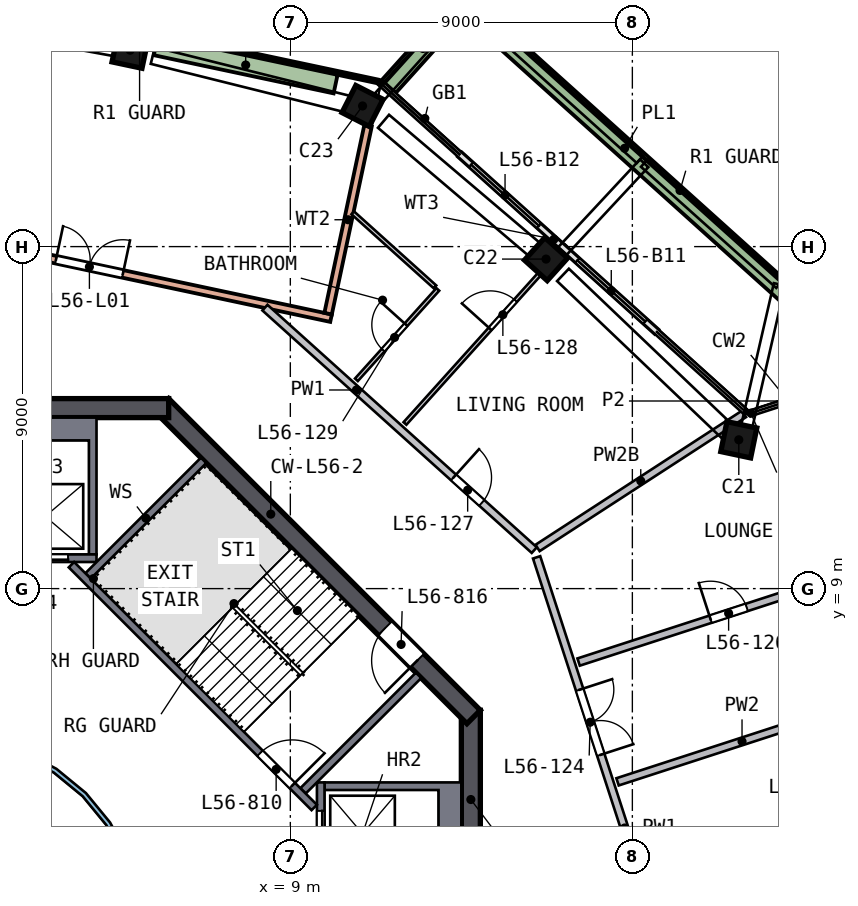
"""IFC4 building model, lengths in metres.
Left out: names, types, materials, properties, quantities, classifications, styles, units other than length and angle.
Written with IfcOpenShell. Run it as: python <this file> out.ifc"""

import sys

from ifc_helpers import new_model, si_unit, direction, frame, frame_2d, origin, origin_2d, place, context, subcontext, project, spatial, polyline, rectangle, outline, extrude, element, fill, save


model = new_model("IFC4")
c1 = context("Model", 3, precision=1e-05, world=origin(), true_north=direction((0.0, 1.0)))
c2 = subcontext(c1, "Body", "Model", "MODEL_VIEW")
j1 = project(units=[si_unit("LENGTHUNIT", "METRE"), si_unit("PLANEANGLEUNIT", "RADIAN")], contexts=[c1])
p1 = place(None, origin())
s1 = spatial("IfcSite", under=j1, at=p1, CompositionType="ELEMENT")
p2 = place(p1, origin())
s2 = spatial("IfcBuilding", under=s1, at=p2, CompositionType="ELEMENT")
p3 = place(p2, frame((0.0, 0.0, 230.5)))
s3 = spatial("IfcBuildingStorey", under=s2, at=p3, CompositionType="ELEMENT", Elevation=230.5)
p4 = place(p3, frame((20.875, 12.797, 0.0), z_axis=(-0.061723248, 0.098741994, 0.993196989), x_axis=(0.976425462, -0.200246615, 0.08058915)))
e1 = element("IfcColumn", 1, at=p4, inside=s3, PredefinedType="COLUMN", context=c2, shape_type="SweptSolid", body=[
    extrude(rectangle(XDim=0.8, YDim=0.8, at=origin_2d()), origin(), (0.0, 0.0, 1.0), 3.212),
])
p5 = place(p3, frame((15.831, 17.582, 0.0), z_axis=(-0.084261508, 0.074603375, 0.993646987), x_axis=(-0.738340463, 0.664972628, -0.112537837)))
e2 = element("IfcColumn", 2, at=p5, inside=s3, PredefinedType="COLUMN", context=c2, shape_type="SweptSolid", body=[
    extrude(rectangle(XDim=0.8, YDim=0.8, at=origin_2d()), origin(), (0.0, 0.0, 1.0), 3.21),
])
p6 = place(p3, frame((11.025, 21.639, 0.0), z_axis=(-0.103314818, 0.051543375, 0.993312302), x_axis=(0.885041164, -0.450968307, 0.11545442)))
e3 = element("IfcColumn", 3, at=p6, inside=s3, PredefinedType="COLUMN", context=c2, shape_type="SweptSolid", body=[
    extrude(rectangle(XDim=0.8, YDim=0.8, at=origin_2d()), origin(), (0.0, 0.0, 1.0), 3.211),
])
p7 = place(p3, frame((4.919, 23.141, 0.0), z_axis=(-0.110270183, 0.022434279, 0.993648424), x_axis=(-0.971985836, 0.206353156, -0.112525153)))
e4 = element("IfcColumn", 4, at=p7, inside=s3, PredefinedType="COLUMN", context=c2, shape_type="SweptSolid", body=[
    extrude(rectangle(XDim=0.8, YDim=0.8, at=origin_2d()), origin(), (0.0, 0.0, 1.0), 3.21),
])
p8 = place(p3, frame((13.75, -5.799, 0.0), z_axis=(0.0, 0.0, 1.0), x_axis=(0.0, 1.0, 0.0)))
e5 = element("IfcWall", 5, at=p8, inside=s3, PredefinedType="SHEAR", context=c2, shape_type="SweptSolid", body=[
    extrude(rectangle(XDim=11.598, YDim=0.5, at=frame_2d((5.799, 0.0))), origin(), (0.0, 0.0, 1.0), 3.5),
])
p9 = place(p8, frame((4.899, 0.0, 0.0)))
e6 = element("IfcOpeningElement", 6, at=p9, cuts=e5, PredefinedType="OPENING", context=c2, shape_type="SweptSolid", body=[
    extrude(rectangle(XDim=1.8, YDim=2.1, at=frame_2d((0.9, 1.05))), frame((0.0, 0.26, 0.0), z_axis=(0.0, -1.0, 0.0), x_axis=(1.0, 0.0, 0.0)), (0.0, 0.0, 1.0), 0.52),
])
p10 = place(p3, frame((13.823, 5.622, 0.0), z_axis=(0.0, 0.0, 1.0), x_axis=(-0.707106781, 0.707106781, 0.0)))
e7 = element("IfcWall", 7, at=p10, inside=s3, PredefinedType="SHEAR", context=c2, shape_type="SweptSolid", body=[
    extrude(rectangle(XDim=11.598, YDim=0.5, at=frame_2d((5.799, 0.0))), origin(), (0.0, 0.0, 1.0), 3.5),
])
p11 = place(p10, frame((2.099, 0.0, 0.0)))
e8 = element("IfcOpeningElement", 8, at=p11, cuts=e7, PredefinedType="OPENING", context=c2, shape_type="SweptSolid", body=[
    extrude(rectangle(XDim=1.2, YDim=2.1, at=frame_2d((0.6, 1.05))), frame((0.0, 0.26, 0.0), z_axis=(0.0, -1.0, 0.0), x_axis=(1.0, 0.0, 0.0)), (0.0, 0.0, 1.0), 0.52),
])
p12 = place(p3, frame((5.799, 13.75, 0.0), z_axis=(0.0, 0.0, 1.0), x_axis=(-1.0, 0.0, 0.0)))
e9 = element("IfcWall", 9, at=p12, inside=s3, PredefinedType="SHEAR", context=c2, shape_type="SweptSolid", body=[
    extrude(rectangle(XDim=11.598, YDim=0.5, at=frame_2d((5.799, 0.0))), origin(), (0.0, 0.0, 1.0), 3.5),
])
p13 = place(p12, frame((4.899, 0.0, 0.0)))
e10 = element("IfcOpeningElement", 10, at=p13, cuts=e9, PredefinedType="OPENING", context=c2, shape_type="SweptSolid", body=[
    extrude(rectangle(XDim=1.8, YDim=2.1, at=frame_2d((0.9, 1.05))), frame((0.0, 0.26, 0.0), z_axis=(0.0, -1.0, 0.0), x_axis=(1.0, 0.0, 0.0)), (0.0, 0.0, 1.0), 0.52),
])
p14 = place(p3, frame((18.634, 15.764, 0.0), z_axis=(0.0, 0.0, 1.0), x_axis=(-0.743165376, 0.669107781, 0.0)))
e11 = element("IfcWall", 11, at=p14, inside=s3, PredefinedType="SOLIDWALL", context=c2, shape_type="SweptSolid", body=[
    extrude(rectangle(XDim=3.3, YDim=0.15, at=frame_2d((1.65, 0.0))), origin(), (0.0, 0.0, 1.0), 2.525),
])
p15 = place(p14, frame((0.4, 0.0, 0.0)))
e12 = element("IfcOpeningElement", 12, at=p15, cuts=e11, PredefinedType="OPENING", context=c2, shape_type="SweptSolid", body=[
    extrude(rectangle(XDim=2.4, YDim=2.4, at=frame_2d((1.2, 1.2))), frame((0.0, 0.085, 0.0), z_axis=(0.0, -1.0, 0.0), x_axis=(1.0, 0.0, 0.0)), (0.0, 0.0, 1.0), 0.17),
])
p16 = place(p3, frame((16.182, 17.972, 0.0), z_axis=(0.0, 0.0, 1.0), x_axis=(-0.743144927, 0.669130493, 0.0)))
e13 = element("IfcWall", 13, at=p16, inside=s3, PredefinedType="SOLIDWALL", context=c2, shape_type="SweptSolid", body=[
    extrude(rectangle(XDim=3.661, YDim=0.15, at=frame_2d((1.831, 0.0))), origin(), (0.0, 0.0, 1.0), 2.525),
])
p17 = place(p16, frame((0.861, 0.0, 0.0)))
e14 = element("IfcOpeningElement", 14, at=p17, cuts=e13, PredefinedType="OPENING", context=c2, shape_type="SweptSolid", body=[
    extrude(rectangle(XDim=2.4, YDim=2.4, at=frame_2d((1.2, 1.2))), frame((0.0, 0.085, 0.0), z_axis=(0.0, -1.0, 0.0), x_axis=(1.0, 0.0, 0.0)), (0.0, 0.0, 1.0), 0.17),
])
p18 = place(p3, frame((22.218, 16.607, 0.0), z_axis=(0.0, 0.0, 1.0), x_axis=(-0.743143128, 0.669132491, 0.0)))
e15 = element("IfcWall", 15, at=p18, inside=s3, PredefinedType="SOLIDWALL", context=c2, shape_type="SweptSolid", body=[
    extrude(rectangle(XDim=11.898, YDim=0.5, at=frame_2d((5.949, 0.0))), origin(), (0.0, 0.0, 1.0), 0.7),
])
p19 = place(p3, frame((13.394, 24.216, 0.0), z_axis=(0.0, 0.0, 1.0), x_axis=(-0.669144611, -0.743132215, 0.0)))
e16 = element("IfcWall", 16, at=p19, inside=s3, PredefinedType="SOLIDWALL", context=c2, shape_type="SweptSolid", body=[
    extrude(rectangle(XDim=2.699, YDim=0.5, at=frame_2d((1.35, 0.0))), origin(), (0.0, 0.0, 1.0), 0.7),
])
p20 = place(p3, frame((-2.645, 18.82, 0.0), z_axis=(0.0, 0.0, 1.0), x_axis=(0.978146821, -0.207915357, 0.0)))
e17 = element("IfcWall", 17, at=p20, inside=s3, PredefinedType="SOLIDWALL", context=c2, shape_type="SweptSolid", body=[
    extrude(rectangle(XDim=13.0, YDim=0.2, at=frame_2d((6.5, 0.0))), origin(), (0.0, 0.0, 1.0), 3.19),
])
p21 = place(p20, frame((5.6, 0.0, 0.0)))
e18 = element("IfcOpeningElement", 18, at=p21, cuts=e17, PredefinedType="OPENING", context=c2, shape_type="SweptSolid", body=[
    extrude(rectangle(XDim=1.8, YDim=2.4, at=frame_2d((0.9, 1.2))), frame((0.0, 0.11, 0.0), z_axis=(0.0, -1.0, 0.0), x_axis=(1.0, 0.0, 0.0)), (0.0, 0.0, 1.0), 0.22),
])
p22 = place(p3, frame((11.045, 21.178, 0.0), z_axis=(0.0, 0.0, 1.0), x_axis=(-0.207928668, -0.978143992, 0.0)))
e19 = element("IfcWall", 19, at=p22, inside=s3, PredefinedType="SOLIDWALL", context=c2, shape_type="SweptSolid", body=[
    extrude(rectangle(XDim=5.053, YDim=0.2, at=frame_2d((2.527, 0.0))), origin(), (0.0, 0.0, 1.0), 3.19),
])
p23 = place(p3, frame((11.313, 22.344, 0.0), z_axis=(0.0, 0.0, 1.0), x_axis=(-0.978146672, 0.207916061, 0.0)))
e20 = element("IfcWall", 20, at=p23, inside=s3, PredefinedType="SOLIDWALL", context=c2, shape_type="SweptSolid", body=[
    extrude(rectangle(XDim=12.84, YDim=0.1, at=frame_2d((6.42, 0.0))), origin(), (0.0, 0.0, 1.0), 0.7),
])
p24 = place(p3, frame((10.191, 22.276, 0.0), z_axis=(0.0, 0.0, 1.0), x_axis=(-0.97814679, 0.207915504, 0.0)))
e21 = element("IfcWall", 21, at=p24, inside=s3, PredefinedType="SOLIDWALL", context=c2, shape_type="SweptSolid", body=[
    extrude(rectangle(XDim=4.837, YDim=0.5, at=frame_2d((2.418, 0.0))), origin(), (0.0, 0.0, 1.0), 0.7),
])
p25 = place(p3, origin())
e22 = element("IfcWall", 22, at=p25, inside=s3, PredefinedType="SOLIDWALL", context=c2, shape_type="SweptSolid", body=[
    extrude(outline(polyline([(13.5, 3.9), (13.5, 1.2), (9.9, 1.2), (9.9, 1.4), (12.9, 1.4), (12.9, 3.7), (9.9, 3.7), (9.9, 3.9), (13.5, 3.9)])), origin(), (0.0, 0.0, 1.0), 3.19),
])
p26 = place(p3, frame((9.8, 1.2, 0.0), z_axis=(0.0, 0.0, 1.0), x_axis=(0.0, 1.0, 0.0)))
e23 = element("IfcWall", 23, at=p26, inside=s3, PredefinedType="SOLIDWALL", context=c2, shape_type="SweptSolid", body=[
    extrude(rectangle(XDim=2.7, YDim=0.2, at=frame_2d((1.35, 0.0))), origin(), (0.0, 0.0, 1.0), 3.19),
])
p27 = place(p26, frame((0.75, 0.0, 0.0)))
e24 = element("IfcOpeningElement", 24, at=p27, cuts=e23, PredefinedType="OPENING", context=c2, shape_type="SweptSolid", body=[
    extrude(rectangle(XDim=1.2, YDim=2.1, at=frame_2d((0.6, 1.05))), frame((0.0, 0.11, 0.0), z_axis=(0.0, -1.0, 0.0), x_axis=(1.0, 0.0, 0.0)), (0.0, 0.0, 1.0), 0.22),
])
p28 = place(p3, origin())
e25 = element("IfcWall", 25, at=p28, inside=s3, PredefinedType="SOLIDWALL", context=c2, shape_type="SweptSolid", body=[
    extrude(outline(polyline([(3.9, 9.9), (3.7, 9.9), (3.7, 12.9), (1.4, 12.9), (1.4, 9.9), (1.2, 9.9), (1.2, 13.5), (3.9, 13.5), (3.9, 9.9)])), origin(), (0.0, 0.0, 1.0), 3.19),
])
p29 = place(p3, frame((1.2, 9.8, 0.0), z_axis=(0.0, 0.0, 1.0), x_axis=(1.0, 0.0, 0.0)))
e26 = element("IfcWall", 26, at=p29, inside=s3, PredefinedType="SOLIDWALL", context=c2, shape_type="SweptSolid", body=[
    extrude(rectangle(XDim=2.7, YDim=0.2, at=frame_2d((1.35, 0.0))), origin(), (0.0, 0.0, 1.0), 3.19),
])
p30 = place(p29, frame((0.75, 0.0, 0.0)))
e27 = element("IfcOpeningElement", 27, at=p30, cuts=e26, PredefinedType="OPENING", context=c2, shape_type="SweptSolid", body=[
    extrude(rectangle(XDim=1.2, YDim=2.1, at=frame_2d((0.6, 1.05))), frame((0.0, 0.11, 0.0), z_axis=(0.0, -1.0, 0.0), x_axis=(1.0, 0.0, 0.0)), (0.0, 0.0, 1.0), 0.22),
])
p31 = place(p3, frame((3.24, 9.629, 0.0), z_axis=(0.0, 0.0, 1.0), x_axis=(0.707106781, -0.707106781, 0.0)))
e28 = element("IfcWall", 28, at=p31, inside=s3, PredefinedType="SOLIDWALL", context=c2, shape_type="SweptSolid", body=[
    extrude(rectangle(XDim=9.036, YDim=0.2, at=frame_2d((4.518, 0.0))), origin(), (0.0, 0.0, 1.0), 3.19),
])
p32 = place(p31, frame((7.018, 0.0, 0.0)))
e29 = element("IfcOpeningElement", 29, at=p32, cuts=e28, PredefinedType="OPENING", context=c2, shape_type="SweptSolid", body=[
    extrude(rectangle(XDim=1.2, YDim=2.1, at=frame_2d((0.6, 1.05))), frame((0.0, 0.11, 0.0), z_axis=(0.0, -1.0, 0.0), x_axis=(1.0, 0.0, 0.0)), (0.0, 0.0, 1.0), 0.22),
])
for number, where, z_axis, x_axis in (
    (30, (9.334, 3.677, 0.0), (0.0, 0.0, 1.0), (0.707, 0.707, 0.0)),
    (31, (3.677, 9.334, 0.0), (0.0, 0.0, 1.0), (0.707, 0.707, 0.0)),
):
    element("IfcWall", number, at=place(p3, frame(where, z_axis=z_axis, x_axis=x_axis)), inside=s3, PredefinedType="SOLIDWALL", context=c2, shape_type="SweptSolid", body=[
        extrude(rectangle(XDim=4.3, YDim=0.2, at=frame_2d((2.15, 0.0))), origin(), (0.0, 0.0, 1.0), 3.19),
    ])
p33 = place(p3, origin())
e32 = element("IfcWall", 32, at=p33, inside=s3, PredefinedType="SOLIDWALL", context=c2, shape_type="SweptSolid", body=[
    extrude(outline(polyline([(5.021, -0.999), (4.73, -1.959), (4.257, -2.844), (3.62, -3.62), (2.844, -4.257), (1.959, -4.73), (0.999, -5.021), (0.0, -5.12), (-0.999, -5.021), (-1.959, -4.73), (-2.844, -4.257), (-3.62, -3.62), (-4.257, -2.844), (-4.73, -1.959), (-5.021, -0.999), (-5.12, 0.0), (-5.021, 0.999), (-4.73, 1.959), (-4.257, 2.844), (-3.62, 3.62), (-2.844, 4.257), (-1.959, 4.73), (-0.999, 5.021), (0.0, 5.12), (0.999, 5.021), (1.959, 4.73), (2.844, 4.257), (3.62, 3.62), (4.257, 2.844), (4.73, 1.959), (5.021, 0.999), (5.12, 0.0), (5.021, -0.999)]), holes=[polyline([(4.904, 0.976), (4.619, 1.913), (4.157, 2.778), (3.535, 3.535), (2.778, 4.157), (1.913, 4.619), (0.976, 4.904), (0.0, 5.0), (-0.976, 4.904), (-1.913, 4.619), (-2.778, 4.157), (-3.535, 3.535), (-4.157, 2.778), (-4.619, 1.913), (-4.904, 0.976), (-5.0, 0.0), (-4.904, -0.976), (-4.619, -1.913), (-4.157, -2.778), (-3.535, -3.535), (-2.778, -4.157), (-1.913, -4.619), (-0.976, -4.904), (0.0, -5.0), (0.976, -4.904), (1.913, -4.619), (2.778, -4.157), (3.535, -3.535), (4.157, -2.778), (4.619, -1.913), (4.904, -0.976), (5.0, 0.0), (4.904, 0.976)])]), origin(), (0.0, 0.0, 1.0), 3.19),
])
p34 = place(p3, frame((8.332, 16.394, 0.0), z_axis=(0.0, 0.0, 1.0), x_axis=(0.743143917, -0.669131616, 0.0)))
e33 = element("IfcWall", 33, at=p34, inside=s3, PredefinedType="SOLIDWALL", context=c2, shape_type="SweptSolid", body=[
    extrude(rectangle(XDim=9.536, YDim=0.2, at=frame_2d((4.768, 0.0))), origin(), (0.0, 0.0, 1.0), 3.19),
])
p35 = place(p34, frame((6.678, 0.0, 0.0)))
e34 = element("IfcOpeningElement", 34, at=p35, cuts=e33, PredefinedType="OPENING", context=c2, shape_type="SweptSolid", body=[
    extrude(rectangle(XDim=1.0, YDim=2.1, at=frame_2d((0.5, 1.05))), frame((0.0, 0.11, 0.0), z_axis=(0.0, -1.0, 0.0), x_axis=(1.0, 0.0, 0.0)), (0.0, 0.0, 1.0), 0.22),
])
p36 = place(p3, frame((15.481, 9.823, 0.0), z_axis=(0.0, 0.0, 1.0), x_axis=(0.309001933, -0.95106141, 0.0)))
e35 = element("IfcWall", 35, at=p36, inside=s3, PredefinedType="SOLIDWALL", context=c2, shape_type="SweptSolid", body=[
    extrude(rectangle(XDim=9.317, YDim=0.2, at=frame_2d((4.658, 0.0))), origin(), (0.0, 0.0, 1.0), 3.19),
])
p37 = place(p36, frame((3.663, 0.0, 0.0)))
e36 = element("IfcOpeningElement", 36, at=p37, cuts=e35, PredefinedType="OPENING", context=c2, shape_type="SweptSolid", body=[
    extrude(rectangle(XDim=1.8, YDim=2.1, at=frame_2d((0.9, 1.05))), frame((0.0, 0.11, 0.0), z_axis=(0.0, -1.0, 0.0), x_axis=(1.0, 0.0, 0.0)), (0.0, 0.0, 1.0), 0.22),
])
p38 = place(p3, frame((15.506, 10.07, 0.0), z_axis=(0.0, 0.0, 1.0), x_axis=(0.838671806, 0.544637128, 0.0)))
e37 = element("IfcWall", 37, at=p38, inside=s3, PredefinedType="SOLIDWALL", context=c2, shape_type="SweptSolid", body=[
    extrude(rectangle(XDim=6.476, YDim=0.2, at=frame_2d((3.238, 0.0))), origin(), (0.0, 0.0, 1.0), 2.69),
])
p39 = place(p3, frame((16.586, 7.067, 0.0), z_axis=(0.0, 0.0, 1.0), x_axis=(0.951053293, 0.309026913, 0.0)))
e38 = element("IfcWall", 38, at=p39, inside=s3, PredefinedType="SOLIDWALL", context=c2, shape_type="SweptSolid", body=[
    extrude(rectangle(XDim=12.038, YDim=0.2, at=frame_2d((6.019, 0.0))), origin(), (0.0, 0.0, 1.0), 3.19),
])
p40 = place(p39, frame((3.65, 0.0, 0.0)))
e39 = element("IfcOpeningElement", 39, at=p40, cuts=e38, PredefinedType="OPENING", context=c2, shape_type="SweptSolid", body=[
    extrude(rectangle(XDim=1.0, YDim=2.1, at=frame_2d((0.5, 1.05))), frame((0.0, 0.11, 0.0), z_axis=(0.0, -1.0, 0.0), x_axis=(1.0, 0.0, 0.0)), (0.0, 0.0, 1.0), 0.22),
])
p41 = place(p3, frame((29.059, 7.635, 0.0), z_axis=(0.0, 0.0, 1.0), x_axis=(-0.951059254, -0.309008568, 0.0)))
e40 = element("IfcWall", 40, at=p41, inside=s3, PredefinedType="SOLIDWALL", context=c2, shape_type="SweptSolid", body=[
    extrude(rectangle(XDim=12.038, YDim=0.2, at=frame_2d((6.019, 0.0))), origin(), (0.0, 0.0, 1.0), 3.19),
])
p42 = place(p41, frame((3.95, 0.0, 0.0)))
e41 = element("IfcOpeningElement", 41, at=p42, cuts=e40, PredefinedType="OPENING", context=c2, shape_type="SweptSolid", body=[
    extrude(rectangle(XDim=1.0, YDim=2.1, at=frame_2d((0.5, 1.05))), frame((0.0, 0.11, 0.0), z_axis=(0.0, -1.0, 0.0), x_axis=(1.0, 0.0, 0.0)), (0.0, 0.0, 1.0), 0.22),
])
p43 = place(p3, frame((12.806, 16.94, 0.0), z_axis=(0.0, 0.0, 1.0), x_axis=(-0.74311485, 0.669163896, 0.0)))
e42 = element("IfcWall", 42, at=p43, inside=s3, PredefinedType="PARTITIONING", context=c2, shape_type="SweptSolid", body=[
    extrude(rectangle(XDim=2.912, YDim=0.1, at=frame_2d((1.456, 0.0))), origin(), (0.0, 0.0, 1.0), 3.19),
])
p44 = place(p3, frame((10.74, 14.495, 0.0), z_axis=(0.0, 0.0, 1.0), x_axis=(0.66909539, 0.743176533, 0.0)))
e43 = element("IfcWall", 43, at=p44, inside=s3, PredefinedType="PARTITIONING", context=c2, shape_type="SweptSolid", body=[
    extrude(rectangle(XDim=3.2, YDim=0.1, at=frame_2d((1.6, 0.0))), origin(), (0.0, 0.0, 1.0), 3.19),
])
p45 = place(p44, frame((1.05, 0.0, 0.0)))
e44 = element("IfcOpeningElement", 44, at=p45, cuts=e43, PredefinedType="OPENING", context=c2, shape_type="SweptSolid", body=[
    extrude(rectangle(XDim=0.9, YDim=2.1, at=frame_2d((0.45, 1.05))), frame((0.0, 0.06, 0.0), z_axis=(0.0, -1.0, 0.0), x_axis=(1.0, 0.0, 0.0)), (0.0, 0.0, 1.0), 0.12),
])
p46 = place(p3, frame((12.017, 13.346, 0.0), z_axis=(0.0, 0.0, 1.0), x_axis=(0.669118247, 0.743155953, 0.0)))
e45 = element("IfcWall", 45, at=p46, inside=s3, PredefinedType="PARTITIONING", context=c2, shape_type="SweptSolid", body=[
    extrude(rectangle(XDim=6.15, YDim=0.1, at=frame_2d((3.075, 0.0))), origin(), (0.0, 0.0, 1.0), 3.19),
])
p47 = place(p46, frame((3.35, 0.0, 0.0)))
e46 = element("IfcOpeningElement", 46, at=p47, cuts=e45, PredefinedType="OPENING", context=c2, shape_type="SweptSolid", body=[
    extrude(rectangle(XDim=1.0, YDim=2.1, at=frame_2d((0.5, 1.05))), frame((0.0, 0.06, 0.0), z_axis=(0.0, -1.0, 0.0), x_axis=(1.0, 0.0, 0.0)), (0.0, 0.0, 1.0), 0.12),
])
p48 = place(p15, origin())
e47 = element("IfcDoor", 47, at=p48, inside=s3, OperationType="SLIDING_TO_RIGHT", PredefinedType="DOOR", context=c2, shape_type="SweptSolid", body=[
    extrude(rectangle(XDim=2.4, YDim=2.4, at=frame_2d((1.2, 1.2))), frame((0.0, 0.025, 0.0), z_axis=(0.0, -1.0, 0.0), x_axis=(1.0, 0.0, 0.0)), (0.0, 0.0, 1.0), 0.05),
])
fill(e12, e47)
p49 = place(p17, origin())
e48 = element("IfcDoor", 48, at=p49, inside=s3, OperationType="SLIDING_TO_LEFT", PredefinedType="DOOR", context=c2, shape_type="SweptSolid", body=[
    extrude(rectangle(XDim=2.4, YDim=2.4, at=frame_2d((1.2, 1.2))), frame((0.0, 0.025, 0.0), z_axis=(0.0, -1.0, 0.0), x_axis=(1.0, 0.0, 0.0)), (0.0, 0.0, 1.0), 0.05),
])
fill(e14, e48)
p50 = place(p21, origin())
e49 = element("IfcDoor", 49, at=p50, inside=s3, OperationType="DOUBLE_DOOR_SINGLE_SWING", PredefinedType="DOOR", context=c2, shape_type="SweptSolid", body=[
    extrude(rectangle(XDim=1.8, YDim=2.4, at=frame_2d((0.9, 1.2))), frame((0.0, 0.025, 0.0), z_axis=(0.0, -1.0, 0.0), x_axis=(1.0, 0.0, 0.0)), (0.0, 0.0, 1.0), 0.05),
])
fill(e18, e49)
p51 = place(p27, origin())
e50 = element("IfcDoor", 50, at=p51, inside=s3, OperationType="DOUBLE_DOOR_SLIDING", PredefinedType="DOOR", context=c2, shape_type="SweptSolid", body=[
    extrude(rectangle(XDim=1.2, YDim=2.1, at=frame_2d((0.6, 1.05))), frame((0.0, 0.025, 0.0), z_axis=(0.0, -1.0, 0.0), x_axis=(1.0, 0.0, 0.0)), (0.0, 0.0, 1.0), 0.05),
])
fill(e24, e50)
p52 = place(p30, origin())
e51 = element("IfcDoor", 51, at=p52, inside=s3, OperationType="DOUBLE_DOOR_SLIDING", PredefinedType="DOOR", context=c2, shape_type="SweptSolid", body=[
    extrude(rectangle(XDim=1.2, YDim=2.1, at=frame_2d((0.6, 1.05))), frame((0.0, 0.025, 0.0), z_axis=(0.0, -1.0, 0.0), x_axis=(1.0, 0.0, 0.0)), (0.0, 0.0, 1.0), 0.05),
])
fill(e27, e51)
p53 = place(p32, origin())
e52 = element("IfcDoor", 52, at=p53, inside=s3, OperationType="SINGLE_SWING_RIGHT", PredefinedType="DOOR", context=c2, shape_type="SweptSolid", body=[
    extrude(rectangle(XDim=1.2, YDim=2.1, at=frame_2d((0.6, 1.05))), frame((0.0, 0.025, 0.0), z_axis=(0.0, -1.0, 0.0), x_axis=(1.0, 0.0, 0.0)), (0.0, 0.0, 1.0), 0.05),
])
fill(e29, e52)
p54 = place(p11, origin())
e53 = element("IfcDoor", 53, at=p54, inside=s3, OperationType="SINGLE_SWING_LEFT", PredefinedType="DOOR", context=c2, shape_type="SweptSolid", body=[
    extrude(rectangle(XDim=1.2, YDim=2.1, at=frame_2d((0.6, 1.05))), frame((0.0, 0.025, 0.0), z_axis=(0.0, -1.0, 0.0), x_axis=(1.0, 0.0, 0.0)), (0.0, 0.0, 1.0), 0.05),
])
fill(e8, e53)
p55 = place(p37, origin())
e54 = element("IfcDoor", 54, at=p55, inside=s3, OperationType="DOUBLE_DOOR_SINGLE_SWING", PredefinedType="DOOR", context=c2, shape_type="SweptSolid", body=[
    extrude(rectangle(XDim=1.8, YDim=2.1, at=frame_2d((0.9, 1.05))), frame((0.0, 0.025, 0.0), z_axis=(0.0, -1.0, 0.0), x_axis=(1.0, 0.0, 0.0)), (0.0, 0.0, 1.0), 0.05),
])
fill(e36, e54)
p56 = place(p40, origin())
e55 = element("IfcDoor", 55, at=p56, inside=s3, OperationType="SINGLE_SWING_LEFT", PredefinedType="DOOR", context=c2, shape_type="SweptSolid", body=[
    extrude(rectangle(XDim=1.0, YDim=2.1, at=frame_2d((0.5, 1.05))), frame((0.0, 0.025, 0.0), z_axis=(0.0, -1.0, 0.0), x_axis=(1.0, 0.0, 0.0)), (0.0, 0.0, 1.0), 0.05),
])
fill(e39, e55)
p57 = place(p35, origin())
e56 = element("IfcDoor", 56, at=p57, inside=s3, OperationType="SINGLE_SWING_LEFT", PredefinedType="DOOR", context=c2, shape_type="SweptSolid", body=[
    extrude(rectangle(XDim=1.0, YDim=2.1, at=frame_2d((0.5, 1.05))), frame((0.0, 0.025, 0.0), z_axis=(0.0, -1.0, 0.0), x_axis=(1.0, 0.0, 0.0)), (0.0, 0.0, 1.0), 0.05),
])
fill(e34, e56)
p58 = place(p47, origin())
e57 = element("IfcDoor", 57, at=p58, inside=s3, OperationType="SINGLE_SWING_LEFT", PredefinedType="DOOR", context=c2, shape_type="SweptSolid", body=[
    extrude(rectangle(XDim=1.0, YDim=2.1, at=frame_2d((0.5, 1.05))), frame((0.0, 0.025, 0.0), z_axis=(0.0, -1.0, 0.0), x_axis=(1.0, 0.0, 0.0)), (0.0, 0.0, 1.0), 0.05),
])
fill(e46, e57)
p59 = place(p45, origin())
e58 = element("IfcDoor", 58, at=p59, inside=s3, OperationType="SINGLE_SWING_RIGHT", PredefinedType="DOOR", context=c2, shape_type="SweptSolid", body=[
    extrude(rectangle(XDim=0.9, YDim=2.1, at=frame_2d((0.45, 1.05))), frame((0.0, 0.025, 0.0), z_axis=(0.0, -1.0, 0.0), x_axis=(1.0, 0.0, 0.0)), (0.0, 0.0, 1.0), 0.05),
])
fill(e44, e58)
save(model, sys.argv[1])
